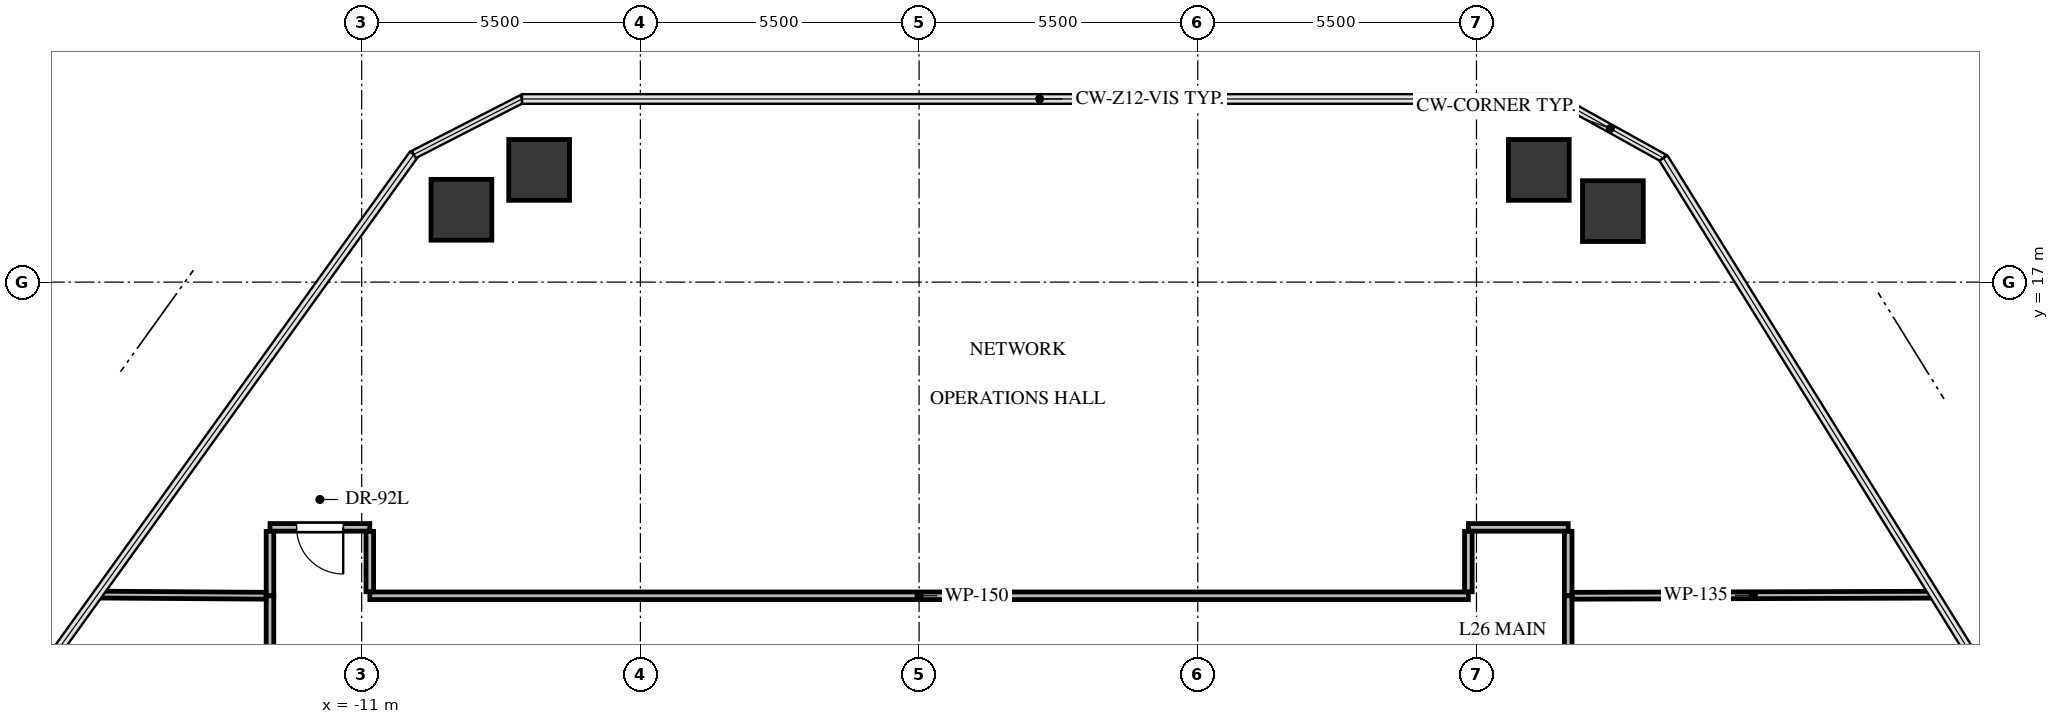
"""IFC4 building model, lengths in metres.
Left out: names, types, materials, properties, quantities, classifications, styles, units other than length and angle.
Written with IfcOpenShell. Run it as: python <this file> out.ifc"""

import sys

from ifc_helpers import new_model, si_unit, direction, frame, frame_2d, origin, origin_2d, place, context, subcontext, project, spatial, rectangle, extrude, source, transform, mapped, element, fill, save


model = new_model("IFC4")
c1 = context("Model", 3, precision=1e-05, world=origin(), true_north=direction((0.0, 1.0)))
c2 = subcontext(c1, "Body", "Model", "MODEL_VIEW")
j1 = project(units=[si_unit("LENGTHUNIT", "METRE"), si_unit("PLANEANGLEUNIT", "RADIAN")], contexts=[c1])
p1 = place(None, origin())
s1 = spatial("IfcSite", under=j1, at=p1, CompositionType="ELEMENT")
p2 = place(p1, origin())
s2 = spatial("IfcBuilding", under=s1, at=p2, CompositionType="ELEMENT")
p3 = place(p2, frame((0.0, 0.0, 100.8)))
s3 = spatial("IfcBuildingStorey", under=s2, at=p3, CompositionType="ELEMENT", Elevation=100.8)
m1 = source(origin(), c2, "Body", "SweptSolid", [
    extrude(rectangle(XDim=1.2, YDim=1.2, at=origin_2d()), origin(), (0.0, 0.0, 1.0), 3.3),
])
for number, where, z_axis, x_axis in (
    (1, (-9.032, 18.428, -0.24), (0.0, 0.0, 1.0), (1.0, 0.0, 0.0)),
    (2, (-7.498, 19.215, -0.24), (0.0, 0.0, 1.0), (1.0, 0.0, 0.0)),
    (3, (12.23, 19.215, -0.24), (0.0, 0.0, 1.0), (1.0, 0.0, 0.0)),
    (4, (13.692, 18.401, -0.24), (0.0, 0.0, 1.0), (1.0, 0.0, 0.0)),
):
    element("IfcColumn", number, at=place(p3, frame(where, z_axis=z_axis, x_axis=x_axis)), inside=s3, PredefinedType="COLUMN", context=c2, shape_type="MappedRepresentation", body=[
        mapped(m1, transform((0.0, 0.0, 0.0), x_axis=(1.0, 0.0, 0.0), y_axis=(0.0, 1.0, 0.0), z_axis=(0.0, 0.0, 1.0), scale=1.0)),
    ])
p4 = place(p3, frame((10.84, 10.81, 0.0), z_axis=(0.0, 0.0, 1.0), x_axis=(-1.0, 0.0, 0.0)))
e5 = element("IfcWall", 5, at=p4, inside=s3, PredefinedType="PARTITIONING", context=c2, shape_type="SweptSolid", body=[
    extrude(rectangle(XDim=21.68, YDim=0.15, at=frame_2d((10.84, 0.0))), origin(), (0.0, 0.0, 1.0), 2.212),
])
p5 = place(p3, frame((12.81, 12.16, 0.0), z_axis=(0.0, 0.0, 1.0), x_axis=(-1.0, 0.0, 0.0)))
e6 = element("IfcWall", 6, at=p5, inside=s3, PredefinedType="PARTITIONING", context=c2, shape_type="SweptSolid", body=[
    extrude(rectangle(XDim=1.97, YDim=0.15, at=frame_2d((0.985, 0.0))), origin(), (0.0, 0.0, 1.0), 2.212),
])
p6 = place(p3, frame((-10.84, 12.16, 0.0), z_axis=(0.0, 0.0, 1.0), x_axis=(-1.0, 0.0, 0.0)))
e7 = element("IfcWall", 7, at=p6, inside=s3, PredefinedType="PARTITIONING", context=c2, shape_type="SweptSolid", body=[
    extrude(rectangle(XDim=1.97, YDim=0.15, at=frame_2d((0.985, 0.0))), origin(), (0.0, 0.0, 1.0), 3.045),
])
p7 = place(p6, frame((0.525, 0.0, 0.0)))
e8 = element("IfcOpeningElement", 8, at=p7, cuts=e7, PredefinedType="OPENING", context=c2, shape_type="SweptSolid", body=[
    extrude(rectangle(XDim=0.92, YDim=2.1, at=frame_2d((0.46, 1.05))), frame((0.0, 0.085, 0.0), z_axis=(0.0, -1.0, 0.0), x_axis=(1.0, 0.0, 0.0)), (0.0, 0.0, 1.0), 0.17),
])
p8 = place(p3, frame((12.81, 10.81, 0.0), z_axis=(0.0, 0.0, 1.0), x_axis=(0.0, 1.0, 0.0)))
e9 = element("IfcWall", 9, at=p8, inside=s3, PredefinedType="PARTITIONING", context=c2, shape_type="SweptSolid", body=[
    extrude(rectangle(XDim=1.271, YDim=0.15, at=frame_2d((0.635, 0.0))), origin(), (0.0, 0.0, 1.0), 3.045),
])
p9 = place(p3, frame((10.84, 12.081, 0.0), z_axis=(0.0, 0.0, 1.0), x_axis=(0.0, -1.0, 0.0)))
e10 = element("IfcWall", 10, at=p9, inside=s3, PredefinedType="PARTITIONING", context=c2, shape_type="SweptSolid", body=[
    extrude(rectangle(XDim=1.192, YDim=0.15, at=frame_2d((0.596, 0.0))), origin(), (0.0, 0.0, 1.0), 2.212),
])
p10 = place(p3, frame((-10.84, 10.889, 0.0), z_axis=(0.0, 0.0, 1.0), x_axis=(0.0, 1.0, 0.0)))
e11 = element("IfcWall", 11, at=p10, inside=s3, PredefinedType="PARTITIONING", context=c2, shape_type="SweptSolid", body=[
    extrude(rectangle(XDim=1.192, YDim=0.15, at=frame_2d((0.596, 0.0))), origin(), (0.0, 0.0, 1.0), 3.045),
])
p11 = place(p3, frame((-12.81, 12.081, 0.0), z_axis=(0.0, 0.0, 1.0), x_axis=(0.0, -1.0, 0.0)))
e12 = element("IfcWall", 12, at=p11, inside=s3, PredefinedType="PARTITIONING", context=c2, shape_type="SweptSolid", body=[
    extrude(rectangle(XDim=1.271, YDim=0.15, at=frame_2d((0.635, 0.0))), origin(), (0.0, 0.0, 1.0), 3.045),
])
p12 = place(p3, frame((-12.81, 10.81, 0.0), z_axis=(0.0, 0.0, 1.0), x_axis=(0.0, -1.0, 0.0)))
e13 = element("IfcWall", 13, at=p12, inside=s3, PredefinedType="PARTITIONING", context=c2, shape_type="SweptSolid", body=[
    extrude(rectangle(XDim=21.62, YDim=0.15, at=frame_2d((10.81, 0.0))), origin(), (0.0, 0.0, 1.0), 2.212),
])
p13 = place(p12, frame((10.35, 0.0, 0.0)))
e14 = element("IfcOpeningElement", 14, at=p13, cuts=e13, PredefinedType="OPENING", context=c2, shape_type="SweptSolid", body=[
    extrude(rectangle(XDim=0.92, YDim=2.1, at=frame_2d((0.46, 1.05))), frame((0.0, 0.085, 0.0), z_axis=(0.0, -1.0, 0.0), x_axis=(1.0, 0.0, 0.0)), (0.0, 0.0, 1.0), 0.17),
])
p14 = place(p3, frame((12.81, 2.49, 0.0), z_axis=(0.0, 0.0, 1.0), x_axis=(0.0, 1.0, 0.0)))
e15 = element("IfcWall", 15, at=p14, inside=s3, PredefinedType="PARTITIONING", context=c2, shape_type="SweptSolid", body=[
    extrude(rectangle(XDim=8.32, YDim=0.15, at=frame_2d((4.16, 0.0))), origin(), (0.0, 0.0, 1.0), 3.045),
])
p15 = place(p14, frame((3.685, 0.0, 0.0)))
e16 = element("IfcOpeningElement", 16, at=p15, cuts=e15, PredefinedType="OPENING", context=c2, shape_type="SweptSolid", body=[
    extrude(rectangle(XDim=0.95, YDim=2.1, at=frame_2d((0.475, 1.05))), frame((0.0, 0.085, 0.0), z_axis=(0.0, -1.0, 0.0), x_axis=(1.0, 0.0, 0.0)), (0.0, 0.0, 1.0), 0.17),
])
p16 = place(p3, frame((-12.889, 10.811, 0.0), z_axis=(0.0, 0.0, 1.0), x_axis=(-0.999976657862, 0.006832549348, 0.0)))
e17 = element("IfcWall", 17, at=p16, inside=s3, PredefinedType="PARTITIONING", context=c2, shape_type="SweptSolid", body=[
    extrude(rectangle(XDim=3.323, YDim=0.135, at=frame_2d((1.662, 0.0))), origin(), (0.0, 0.0, 1.0), 2.38),
])
p17 = place(p3, frame((20.035, 10.831, 0.0), z_axis=(0.0, 0.0, 1.0), x_axis=(-0.999995783715, -0.002903885812, 0.0)))
e18 = element("IfcWall", 18, at=p17, inside=s3, PredefinedType="PARTITIONING", context=c2, shape_type="SweptSolid", body=[
    extrude(rectangle(XDim=7.146, YDim=0.135, at=frame_2d((3.573, 0.0))), origin(), (0.0, 0.0, 1.0), 2.38),
])
m2 = source(origin(), c2, "Body", "SweptSolid", [
    extrude(rectangle(XDim=0.92, YDim=2.1, at=frame_2d((0.46, 1.05))), frame((0.0, 0.025, 0.0), z_axis=(0.0, -1.0, 0.0), x_axis=(1.0, 0.0, 0.0)), (0.0, 0.0, 1.0), 0.05),
])
p18 = place(p7, origin())
e19 = element("IfcDoor", 19, at=p18, inside=s3, OperationType="SINGLE_SWING_LEFT", PredefinedType="DOOR", context=c2, shape_type="MappedRepresentation", body=[
    mapped(m2, transform((0.0, 0.0, 0.0), x_axis=(1.0, 0.0, 0.0), y_axis=(0.0, 1.0, 0.0), z_axis=(0.0, 0.0, 1.0), scale=1.0)),
])
fill(e8, e19)
save(model, sys.argv[1])
